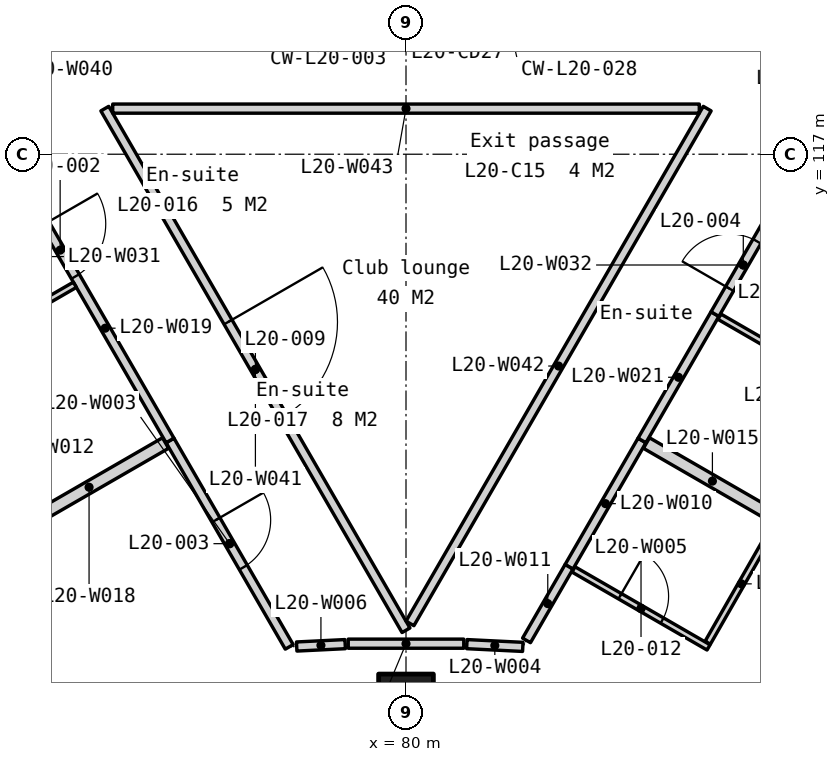
"""IFC4 building model, lengths in metres.
Left out: names, types, materials, properties, quantities, classifications, styles, units other than length and angle.
Written with IfcOpenShell. Run it as: python <this file> out.ifc"""

import sys

from ifc_helpers import new_model, si_unit, direction, frame, frame_2d, origin, origin_2d, place, context, subcontext, project, spatial, polyline, rectangle, outline, extrude, element, fill, save


model = new_model("IFC4")
c1 = context("Model", 3, precision=1e-05, world=origin(), true_north=direction((0.0, 1.0)))
c2 = subcontext(c1, "Body", "Model", "MODEL_VIEW")
j1 = project(units=[si_unit("LENGTHUNIT", "METRE"), si_unit("PLANEANGLEUNIT", "RADIAN")], contexts=[c1])
p1 = place(None, origin())
s1 = spatial("IfcSite", under=j1, at=p1, CompositionType="ELEMENT")
p2 = place(p1, origin())
s2 = spatial("IfcBuilding", under=s1, at=p2, CompositionType="ELEMENT")
p3 = place(p2, frame((0.0, 0.0, 85.3)))
s3 = spatial("IfcBuildingStorey", under=s2, at=p3, CompositionType="ELEMENT", Elevation=85.3)
p4 = place(p3, frame((80.0, 108.0, 0.0), z_axis=(0.0, 0.0, 1.0), x_axis=(1.0, 0.0, 0.0)))
e1 = element("IfcColumn", 1, at=p4, inside=s3, PredefinedType="COLUMN", context=c2, shape_type="SweptSolid", body=[
    extrude(rectangle(XDim=0.9, YDim=0.9, at=origin_2d()), origin(), (0.0, 0.0, 1.0), 3.5),
])
p5 = place(p3, frame((56.073, 130.263, -0.15), z_axis=(0.0, 0.0, 1.0), x_axis=(0.500000478905, -0.866025127289, 0.0)))
e2 = element("IfcWall", 2, at=p5, inside=s3, PredefinedType="SOLIDWALL", context=c2, shape_type="SweptSolid", body=[
    extrude(outline(polyline([(42.643, 0.0), (42.643, 3.5), (0.0, 3.5), (0.0, 0.0), (42.643, 0.0)])), frame((0.0, 0.225, 0.0), z_axis=(0.0, -1.0, 0.0), x_axis=(1.0, 0.0, 0.0)), (0.0, 0.0, 1.0), 0.45),
])
p6 = place(p5, frame((7.079, 0.0, 1.05)))
e3 = element("IfcOpeningElement", 3, at=p6, cuts=e2, PredefinedType="OPENING", context=c2, shape_type="SweptSolid", body=[
    extrude(rectangle(XDim=1.2, YDim=1.5, at=frame_2d((0.6, 0.75))), frame((0.0, 0.235, 0.0), z_axis=(0.0, -1.0, 0.0), x_axis=(1.0, 0.0, 0.0)), (0.0, 0.0, 1.0), 0.47),
])
p7 = place(p5, frame((8.779, 0.0, 1.05)))
e4 = element("IfcOpeningElement", 4, at=p7, cuts=e2, PredefinedType="OPENING", context=c2, shape_type="SweptSolid", body=[
    extrude(rectangle(XDim=1.2, YDim=1.5, at=frame_2d((0.6, 0.75))), frame((0.0, 0.235, 0.0), z_axis=(0.0, -1.0, 0.0), x_axis=(1.0, 0.0, 0.0)), (0.0, 0.0, 1.0), 0.47),
])
p8 = place(p5, frame((15.607, 0.0, 1.05)))
e5 = element("IfcOpeningElement", 5, at=p8, cuts=e2, PredefinedType="OPENING", context=c2, shape_type="SweptSolid", body=[
    extrude(rectangle(XDim=1.2, YDim=1.5, at=frame_2d((0.6, 0.75))), frame((0.0, 0.235, 0.0), z_axis=(0.0, -1.0, 0.0), x_axis=(1.0, 0.0, 0.0)), (0.0, 0.0, 1.0), 0.47),
])
p9 = place(p5, frame((17.307, 0.0, 1.05)))
e6 = element("IfcOpeningElement", 6, at=p9, cuts=e2, PredefinedType="OPENING", context=c2, shape_type="SweptSolid", body=[
    extrude(rectangle(XDim=1.2, YDim=1.5, at=frame_2d((0.6, 0.75))), frame((0.0, 0.235, 0.0), z_axis=(0.0, -1.0, 0.0), x_axis=(1.0, 0.0, 0.0)), (0.0, 0.0, 1.0), 0.47),
])
p10 = place(p5, frame((24.136, 0.0, 1.05)))
e7 = element("IfcOpeningElement", 7, at=p10, cuts=e2, PredefinedType="OPENING", context=c2, shape_type="SweptSolid", body=[
    extrude(rectangle(XDim=1.2, YDim=1.5, at=frame_2d((0.6, 0.75))), frame((0.0, 0.235, 0.0), z_axis=(0.0, -1.0, 0.0), x_axis=(1.0, 0.0, 0.0)), (0.0, 0.0, 1.0), 0.47),
])
p11 = place(p5, frame((25.836, 0.0, 1.05)))
e8 = element("IfcOpeningElement", 8, at=p11, cuts=e2, PredefinedType="OPENING", context=c2, shape_type="SweptSolid", body=[
    extrude(rectangle(XDim=1.2, YDim=1.5, at=frame_2d((0.6, 0.75))), frame((0.0, 0.235, 0.0), z_axis=(0.0, -1.0, 0.0), x_axis=(1.0, 0.0, 0.0)), (0.0, 0.0, 1.0), 0.47),
])
p12 = place(p5, frame((32.665, 0.0, 1.05)))
e9 = element("IfcOpeningElement", 9, at=p12, cuts=e2, PredefinedType="OPENING", context=c2, shape_type="SweptSolid", body=[
    extrude(rectangle(XDim=1.2, YDim=1.5, at=frame_2d((0.6, 0.75))), frame((0.0, 0.235, 0.0), z_axis=(0.0, -1.0, 0.0), x_axis=(1.0, 0.0, 0.0)), (0.0, 0.0, 1.0), 0.47),
])
p13 = place(p5, frame((34.365, 0.0, 1.05)))
e10 = element("IfcOpeningElement", 10, at=p13, cuts=e2, PredefinedType="OPENING", context=c2, shape_type="SweptSolid", body=[
    extrude(rectangle(XDim=1.2, YDim=1.5, at=frame_2d((0.6, 0.75))), frame((0.0, 0.235, 0.0), z_axis=(0.0, -1.0, 0.0), x_axis=(1.0, 0.0, 0.0)), (0.0, 0.0, 1.0), 0.47),
])
p14 = place(p3, frame((82.605, 93.333, -0.15), z_axis=(0.0, 0.0, 1.0), x_axis=(0.500000478905, 0.866025127289, 0.0)))
e11 = element("IfcWall", 11, at=p14, inside=s3, PredefinedType="SOLIDWALL", context=c2, shape_type="SweptSolid", body=[
    extrude(outline(polyline([(42.643, 0.0), (42.643, 3.5), (0.0, 3.5), (0.0, 0.0), (42.643, 0.0)])), frame((0.0, 0.225, 0.0), z_axis=(0.0, -1.0, 0.0), x_axis=(1.0, 0.0, 0.0)), (0.0, 0.0, 1.0), 0.45),
])
p15 = place(p14, frame((7.079, 0.0, 1.05)))
e12 = element("IfcOpeningElement", 12, at=p15, cuts=e11, PredefinedType="OPENING", context=c2, shape_type="SweptSolid", body=[
    extrude(rectangle(XDim=1.2, YDim=1.5, at=frame_2d((0.6, 0.75))), frame((0.0, 0.235, 0.0), z_axis=(0.0, -1.0, 0.0), x_axis=(1.0, 0.0, 0.0)), (0.0, 0.0, 1.0), 0.47),
])
p16 = place(p14, frame((8.779, 0.0, 1.05)))
e13 = element("IfcOpeningElement", 13, at=p16, cuts=e11, PredefinedType="OPENING", context=c2, shape_type="SweptSolid", body=[
    extrude(rectangle(XDim=1.2, YDim=1.5, at=frame_2d((0.6, 0.75))), frame((0.0, 0.235, 0.0), z_axis=(0.0, -1.0, 0.0), x_axis=(1.0, 0.0, 0.0)), (0.0, 0.0, 1.0), 0.47),
])
p17 = place(p14, frame((15.607, 0.0, 1.05)))
e14 = element("IfcOpeningElement", 14, at=p17, cuts=e11, PredefinedType="OPENING", context=c2, shape_type="SweptSolid", body=[
    extrude(rectangle(XDim=1.2, YDim=1.5, at=frame_2d((0.6, 0.75))), frame((0.0, 0.235, 0.0), z_axis=(0.0, -1.0, 0.0), x_axis=(1.0, 0.0, 0.0)), (0.0, 0.0, 1.0), 0.47),
])
p18 = place(p14, frame((17.307, 0.0, 1.05)))
e15 = element("IfcOpeningElement", 15, at=p18, cuts=e11, PredefinedType="OPENING", context=c2, shape_type="SweptSolid", body=[
    extrude(rectangle(XDim=1.2, YDim=1.5, at=frame_2d((0.6, 0.75))), frame((0.0, 0.235, 0.0), z_axis=(0.0, -1.0, 0.0), x_axis=(1.0, 0.0, 0.0)), (0.0, 0.0, 1.0), 0.47),
])
p19 = place(p14, frame((24.136, 0.0, 1.05)))
e16 = element("IfcOpeningElement", 16, at=p19, cuts=e11, PredefinedType="OPENING", context=c2, shape_type="SweptSolid", body=[
    extrude(rectangle(XDim=1.2, YDim=1.5, at=frame_2d((0.6, 0.75))), frame((0.0, 0.235, 0.0), z_axis=(0.0, -1.0, 0.0), x_axis=(1.0, 0.0, 0.0)), (0.0, 0.0, 1.0), 0.47),
])
p20 = place(p14, frame((25.836, 0.0, 1.05)))
e17 = element("IfcOpeningElement", 17, at=p20, cuts=e11, PredefinedType="OPENING", context=c2, shape_type="SweptSolid", body=[
    extrude(rectangle(XDim=1.2, YDim=1.5, at=frame_2d((0.6, 0.75))), frame((0.0, 0.235, 0.0), z_axis=(0.0, -1.0, 0.0), x_axis=(1.0, 0.0, 0.0)), (0.0, 0.0, 1.0), 0.47),
])
p21 = place(p14, frame((32.665, 0.0, 1.05)))
e18 = element("IfcOpeningElement", 18, at=p21, cuts=e11, PredefinedType="OPENING", context=c2, shape_type="SweptSolid", body=[
    extrude(rectangle(XDim=1.2, YDim=1.5, at=frame_2d((0.6, 0.75))), frame((0.0, 0.235, 0.0), z_axis=(0.0, -1.0, 0.0), x_axis=(1.0, 0.0, 0.0)), (0.0, 0.0, 1.0), 0.47),
])
p22 = place(p14, frame((34.365, 0.0, 1.05)))
e19 = element("IfcOpeningElement", 19, at=p22, cuts=e11, PredefinedType="OPENING", context=c2, shape_type="SweptSolid", body=[
    extrude(rectangle(XDim=1.2, YDim=1.5, at=frame_2d((0.6, 0.75))), frame((0.0, 0.235, 0.0), z_axis=(0.0, -1.0, 0.0), x_axis=(1.0, 0.0, 0.0)), (0.0, 0.0, 1.0), 0.47),
])
p23 = place(p3, frame((76.119, 112.292, 0.0), z_axis=(0.0, 0.0, 1.0), x_axis=(0.50006385284, -0.865988535192, 0.0)))
e20 = element("IfcWall", 20, at=p23, inside=s3, PredefinedType="PARTITIONING", context=c2, shape_type="SweptSolid", body=[
    extrude(rectangle(XDim=3.92, YDim=0.15, at=frame_2d((1.96, 0.0))), origin(), (0.0, 0.0, 1.0), 3.35),
])
p24 = place(p23, frame((1.51, 0.0, 0.0)))
e21 = element("IfcOpeningElement", 21, at=p24, cuts=e20, PredefinedType="OPENING", context=c2, shape_type="SweptSolid", body=[
    extrude(rectangle(XDim=0.9, YDim=2.1, at=frame_2d((0.45, 1.05))), frame((0.0, 0.085, 0.0), z_axis=(0.0, -1.0, 0.0), x_axis=(1.0, 0.0, 0.0)), (0.0, 0.0, 1.0), 0.17),
])
p25 = place(p3, frame((81.0, 108.943, 0.0), z_axis=(0.0, 0.0, 1.0), x_axis=(0.998784510433, -0.04928997584, 0.0)))
e22 = element("IfcWall", 22, at=p25, inside=s3, PredefinedType="PARTITIONING", context=c2, shape_type="SweptSolid", body=[
    extrude(rectangle(XDim=0.921, YDim=0.15, at=frame_2d((0.461, 0.0))), origin(), (0.0, 0.0, 1.0), 3.35),
])
p26 = place(p3, frame((82.754, 110.171, 0.0), z_axis=(0.0, 0.0, 1.0), x_axis=(0.866038183914, -0.499977863513, 0.0)))
e23 = element("IfcWall", 23, at=p26, inside=s3, PredefinedType="PARTITIONING", context=c2, shape_type="SweptSolid", body=[
    extrude(rectangle(XDim=2.565, YDim=0.1, at=frame_2d((1.282, 0.0))), origin(), (0.0, 0.0, 1.0), 3.35),
])
p27 = place(p26, frame((0.883, 0.0, 0.0)))
e24 = element("IfcOpeningElement", 24, at=p27, cuts=e23, PredefinedType="OPENING", context=c2, shape_type="SweptSolid", body=[
    extrude(rectangle(XDim=0.8, YDim=2.1, at=frame_2d((0.4, 1.05))), frame((0.0, 0.06, 0.0), z_axis=(0.0, -1.0, 0.0), x_axis=(1.0, 0.0, 0.0)), (0.0, 0.0, 1.0), 0.12),
])
p28 = place(p3, frame((78.202, 108.903, 0.0), z_axis=(0.0, 0.0, 1.0), x_axis=(0.99878643161, 0.049251030778, 0.0)))
e25 = element("IfcWall", 25, at=p28, inside=s3, PredefinedType="PARTITIONING", context=c2, shape_type="SweptSolid", body=[
    extrude(rectangle(XDim=0.798, YDim=0.15, at=frame_2d((0.399, 0.0))), origin(), (0.0, 0.0, 1.0), 3.35),
])
p29 = place(p3, frame((79.05, 108.95, 0.0), z_axis=(0.0, 0.0, 1.0), x_axis=(1.0, 0.0, 0.0)))
e26 = element("IfcWall", 26, at=p29, inside=s3, PredefinedType="PARTITIONING", context=c2, shape_type="SweptSolid", body=[
    extrude(rectangle(XDim=1.9, YDim=0.15, at=frame_2d((0.95, 0.0))), origin(), (0.0, 0.0, 1.0), 3.35),
])
p30 = place(p3, frame((82.681, 110.214, 0.0), z_axis=(0.0, 0.0, 1.0), x_axis=(0.500001309137, 0.866024647952, 0.0)))
e27 = element("IfcWall", 27, at=p30, inside=s3, PredefinedType="PARTITIONING", context=c2, shape_type="SweptSolid", body=[
    extrude(rectangle(XDim=2.4, YDim=0.15, at=frame_2d((1.2, 0.0))), origin(), (0.0, 0.0, 1.0), 3.35),
])
p31 = place(p3, frame((81.982, 109.004, 0.0), z_axis=(0.0, 0.0, 1.0), x_axis=(0.500009789943, 0.866019751484, 0.0)))
e28 = element("IfcWall", 28, at=p31, inside=s3, PredefinedType="PARTITIONING", context=c2, shape_type="SweptSolid", body=[
    extrude(rectangle(XDim=1.397, YDim=0.15, at=frame_2d((0.699, 0.0))), origin(), (0.0, 0.0, 1.0), 3.35),
])
p32 = place(p3, frame((84.962, 108.966, 0.0), z_axis=(0.0, 0.0, 1.0), x_axis=(0.496351132973, 0.868121853657, 0.0)))
e29 = element("IfcWall", 29, at=p32, inside=s3, PredefinedType="PARTITIONING", context=c2, shape_type="SweptSolid", body=[
    extrude(rectangle(XDim=2.23, YDim=0.1, at=frame_2d((1.115, 0.0))), origin(), (0.0, 0.0, 1.0), 3.35),
])
p33 = place(p3, frame((83.954, 112.25, 0.0), z_axis=(0.0, 0.0, 1.0), x_axis=(0.866039519639, -0.499975549825, 0.0)))
e30 = element("IfcWall", 30, at=p33, inside=s3, PredefinedType="PARTITIONING", context=c2, shape_type="SweptSolid", body=[
    extrude(rectangle(XDim=2.505, YDim=0.2, at=frame_2d((1.252, 0.0))), origin(), (0.0, 0.0, 1.0), 3.35),
])
p34 = place(p3, frame((73.53, 110.797, 0.0), z_axis=(0.0, 0.0, 1.0), x_axis=(0.866047038303, 0.499962526042, 0.0)))
e31 = element("IfcWall", 31, at=p34, inside=s3, PredefinedType="PARTITIONING", context=c2, shape_type="SweptSolid", body=[
    extrude(rectangle(XDim=2.905, YDim=0.2, at=frame_2d((1.453, 0.0))), origin(), (0.0, 0.0, 1.0), 3.35),
])
p35 = place(p3, frame((73.987, 115.985, 0.0), z_axis=(0.0, 0.0, 1.0), x_axis=(0.4999752019, -0.866039720501, 0.0)))
e32 = element("IfcWall", 32, at=p35, inside=s3, PredefinedType="PARTITIONING", context=c2, shape_type="SweptSolid", body=[
    extrude(rectangle(XDim=4.264, YDim=0.15, at=frame_2d((2.132, 0.0))), origin(), (0.0, 0.0, 1.0), 3.35),
])
p36 = place(p35, frame((0.15, 0.0, 0.0)))
e33 = element("IfcOpeningElement", 33, at=p36, cuts=e32, PredefinedType="OPENING", context=c2, shape_type="SweptSolid", body=[
    extrude(rectangle(XDim=1.0, YDim=2.1, at=frame_2d((0.5, 1.05))), frame((0.0, 0.085, 0.0), z_axis=(0.0, -1.0, 0.0), x_axis=(1.0, 0.0, 0.0)), (0.0, 0.0, 1.0), 0.17),
])
p37 = place(p3, frame((83.881, 112.292, 0.0), z_axis=(0.0, 0.0, 1.0), x_axis=(0.500001309137, 0.866024647952, 0.0)))
e34 = element("IfcWall", 34, at=p37, inside=s3, PredefinedType="PARTITIONING", context=c2, shape_type="SweptSolid", body=[
    extrude(rectangle(XDim=2.4, YDim=0.15, at=frame_2d((1.2, 0.0))), origin(), (0.0, 0.0, 1.0), 3.35),
])
p38 = place(p3, frame((72.073, 113.42, 0.0), z_axis=(0.0, 0.0, 1.0), x_axis=(0.866047940603, 0.499960963054, 0.0)))
e35 = element("IfcWall", 35, at=p38, inside=s3, PredefinedType="PARTITIONING", context=c2, shape_type="SweptSolid", body=[
    extrude(rectangle(XDim=2.865, YDim=0.1, at=frame_2d((1.433, 0.0))), origin(), (0.0, 0.0, 1.0), 3.35),
])
p39 = place(p3, frame((85.154, 114.328, 0.0), z_axis=(0.0, 0.0, 1.0), x_axis=(0.866074639999, -0.499914710676, 0.0)))
e36 = element("IfcWall", 36, at=p39, inside=s3, PredefinedType="PARTITIONING", context=c2, shape_type="SweptSolid", body=[
    extrude(rectangle(XDim=2.455, YDim=0.1, at=frame_2d((1.228, 0.0))), origin(), (0.0, 0.0, 1.0), 3.35),
])
p40 = place(p39, frame((0.827, 0.0, 0.0)))
e37 = element("IfcOpeningElement", 37, at=p40, cuts=e36, PredefinedType="OPENING", context=c2, shape_type="SweptSolid", body=[
    extrude(rectangle(XDim=0.8, YDim=2.1, at=frame_2d((0.4, 1.05))), frame((0.0, 0.06, 0.0), z_axis=(0.0, -1.0, 0.0), x_axis=(1.0, 0.0, 0.0)), (0.0, 0.0, 1.0), 0.12),
])
p41 = place(p3, frame((85.081, 114.371, 0.0), z_axis=(0.0, 0.0, 1.0), x_axis=(0.499941596792, 0.866059120267, 0.0)))
e38 = element("IfcWall", 38, at=p41, inside=s3, PredefinedType="PARTITIONING", context=c2, shape_type="SweptSolid", body=[
    extrude(rectangle(XDim=1.865, YDim=0.15, at=frame_2d((0.932, 0.0))), origin(), (0.0, 0.0, 1.0), 3.35),
])
p42 = place(p41, frame((0.482, 0.0, 0.0)))
e39 = element("IfcOpeningElement", 39, at=p42, cuts=e38, PredefinedType="OPENING", context=c2, shape_type="SweptSolid", body=[
    extrude(rectangle(XDim=0.9, YDim=2.1, at=frame_2d((0.45, 1.05))), frame((0.0, 0.085, 0.0), z_axis=(0.0, -1.0, 0.0), x_axis=(1.0, 0.0, 0.0)), (0.0, 0.0, 1.0), 0.17),
])
p43 = place(p3, frame((75.047, 117.75, 0.0), z_axis=(0.0, 0.0, 1.0), x_axis=(0.499995505729, -0.866027998537, 0.0)))
e40 = element("IfcWall", 40, at=p43, inside=s3, PredefinedType="PARTITIONING", context=c2, shape_type="SweptSolid", body=[
    extrude(rectangle(XDim=9.907, YDim=0.15, at=frame_2d((4.953, 0.0))), origin(), (0.0, 0.0, 1.0), 3.35),
])
p44 = place(p43, frame((4.053, 0.0, 0.0)))
e41 = element("IfcOpeningElement", 41, at=p44, cuts=e40, PredefinedType="OPENING", context=c2, shape_type="SweptSolid", body=[
    extrude(rectangle(XDim=1.8, YDim=2.1, at=frame_2d((0.9, 1.05))), frame((0.0, 0.085, 0.0), z_axis=(0.0, -1.0, 0.0), x_axis=(1.0, 0.0, 0.0)), (0.0, 0.0, 1.0), 0.17),
])
p45 = place(p3, frame((80.065, 109.283, 0.0), z_axis=(0.0, 0.0, 1.0), x_axis=(0.49999841397, 0.866026319477, 0.0)))
e42 = element("IfcWall", 42, at=p45, inside=s3, PredefinedType="PARTITIONING", context=c2, shape_type="SweptSolid", body=[
    extrude(rectangle(XDim=9.777, YDim=0.15, at=frame_2d((4.888, 0.0))), origin(), (0.0, 0.0, 1.0), 3.35),
])
p46 = place(p3, frame((75.177, 117.75, 0.0), z_axis=(0.0, 0.0, 1.0), x_axis=(1.0, 0.0, 0.0)))
e43 = element("IfcWall", 43, at=p46, inside=s3, PredefinedType="PARTITIONING", context=c2, shape_type="SweptSolid", body=[
    extrude(rectangle(XDim=9.647, YDim=0.15, at=frame_2d((4.823, 0.0))), origin(), (0.0, 0.0, 1.0), 3.35),
])
p47 = place(p36, origin())
e44 = element("IfcDoor", 44, at=p47, inside=s3, OperationType="SINGLE_SWING_LEFT", PredefinedType="DOOR", context=c2, shape_type="SweptSolid", body=[
    extrude(rectangle(XDim=1.0, YDim=2.1, at=frame_2d((0.5, 1.05))), frame((0.0, 0.025, 0.0), z_axis=(0.0, -1.0, 0.0), x_axis=(1.0, 0.0, 0.0)), (0.0, 0.0, 1.0), 0.05),
])
fill(e33, e44)
p48 = place(p24, origin())
e45 = element("IfcDoor", 45, at=p48, inside=s3, OperationType="SINGLE_SWING_LEFT", PredefinedType="DOOR", context=c2, shape_type="SweptSolid", body=[
    extrude(rectangle(XDim=0.9, YDim=2.1, at=frame_2d((0.45, 1.05))), frame((0.0, 0.025, 0.0), z_axis=(0.0, -1.0, 0.0), x_axis=(1.0, 0.0, 0.0)), (0.0, 0.0, 1.0), 0.05),
])
fill(e21, e45)
p49 = place(p42, origin())
e46 = element("IfcDoor", 46, at=p49, inside=s3, OperationType="SINGLE_SWING_LEFT", PredefinedType="DOOR", context=c2, shape_type="SweptSolid", body=[
    extrude(rectangle(XDim=0.9, YDim=2.1, at=frame_2d((0.45, 1.05))), frame((0.0, 0.025, 0.0), z_axis=(0.0, -1.0, 0.0), x_axis=(1.0, 0.0, 0.0)), (0.0, 0.0, 1.0), 0.05),
])
fill(e39, e46)
p50 = place(p44, origin())
e47 = element("IfcDoor", 47, at=p50, inside=s3, OperationType="SINGLE_SWING_LEFT", PredefinedType="DOOR", context=c2, shape_type="SweptSolid", body=[
    extrude(rectangle(XDim=1.8, YDim=2.1, at=frame_2d((0.9, 1.05))), frame((0.0, 0.025, 0.0), z_axis=(0.0, -1.0, 0.0), x_axis=(1.0, 0.0, 0.0)), (0.0, 0.0, 1.0), 0.05),
])
fill(e41, e47)
p51 = place(p27, origin())
e48 = element("IfcDoor", 48, at=p51, inside=s3, OperationType="SINGLE_SWING_LEFT", PredefinedType="DOOR", context=c2, shape_type="SweptSolid", body=[
    extrude(rectangle(XDim=0.8, YDim=2.1, at=frame_2d((0.4, 1.05))), frame((0.0, 0.025, 0.0), z_axis=(0.0, -1.0, 0.0), x_axis=(1.0, 0.0, 0.0)), (0.0, 0.0, 1.0), 0.05),
])
fill(e24, e48)
save(model, sys.argv[1])
